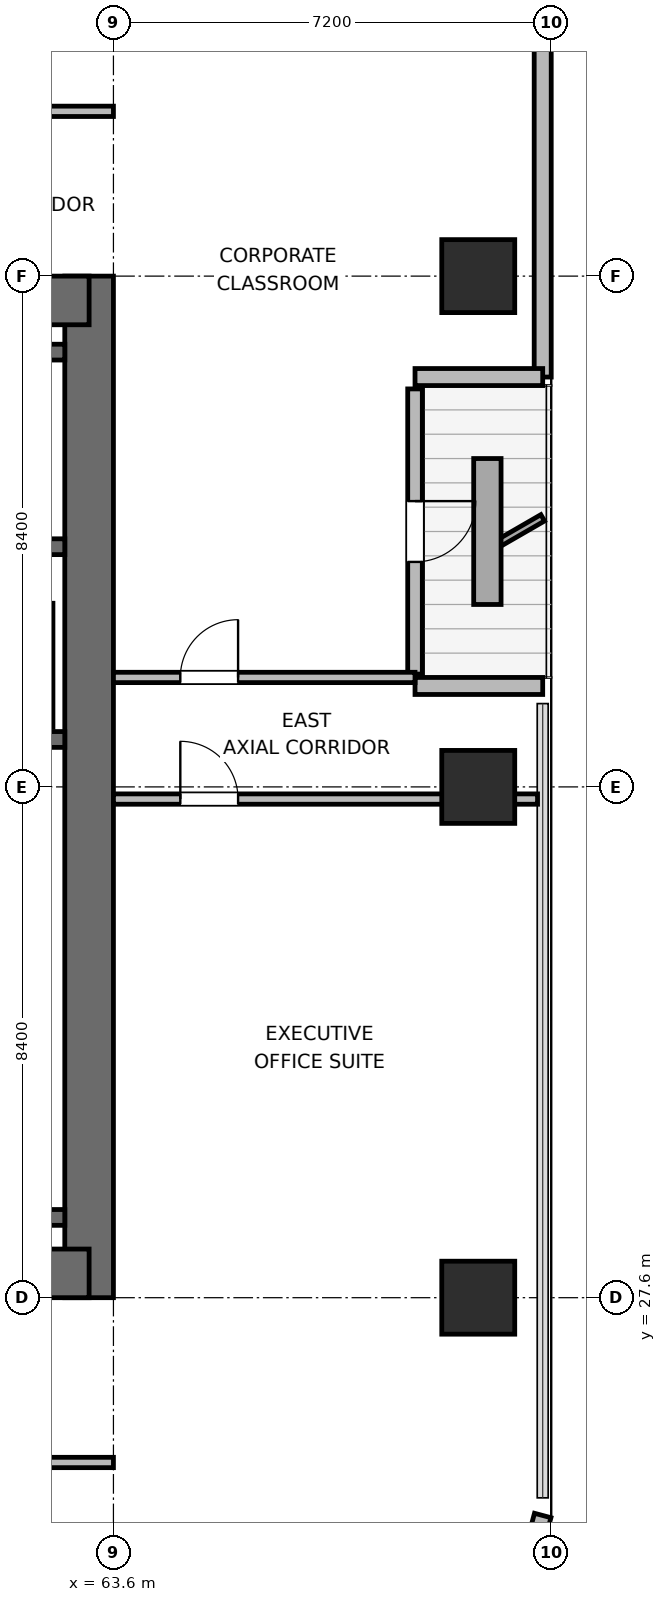
"""IFC4 building model, lengths in metres.
Left out: names, types, materials, properties, quantities, classifications, styles, units other than length and angle.
Written with IfcOpenShell. Run it as: python <this file> out.ifc"""

import sys

from ifc_helpers import new_model, si_unit, direction, frame, frame_2d, origin, origin_2d, place, context, subcontext, project, spatial, rectangle, extrude, element, fill, save


model = new_model("IFC4")
c1 = context("Model", 3, precision=1e-05, world=origin(), true_north=direction((0.0, 1.0)))
c2 = subcontext(c1, "Body", "Model", "MODEL_VIEW")
j1 = project(units=[si_unit("LENGTHUNIT", "METRE"), si_unit("PLANEANGLEUNIT", "RADIAN")], contexts=[c1])
p1 = place(None, origin())
s1 = spatial("IfcSite", under=j1, at=p1, CompositionType="ELEMENT")
p2 = place(p1, origin())
s2 = spatial("IfcBuilding", under=s1, at=p2, CompositionType="ELEMENT")
p3 = place(p2, frame((0.0, 0.0, 166.2)))
s3 = spatial("IfcBuildingStorey", under=s2, at=p3, CompositionType="ELEMENT", Elevation=166.2)
p4 = place(p3, frame((63.2, 27.6, 0.0), z_axis=(0.0, 0.0, 1.0), x_axis=(0.0, 1.0, 0.0)))
e1 = element("IfcWall", 1, at=p4, inside=s3, PredefinedType="SHEAR", context=c2, shape_type="SweptSolid", body=[
    extrude(rectangle(XDim=16.8, YDim=0.8, at=frame_2d((8.4, 0.0))), origin(), (0.0, 0.0, 1.0), 3.9),
])
p5 = place(p3, frame((54.0, 28.0, 0.0), z_axis=(0.0, 0.0, 1.0), x_axis=(1.0, 0.0, 0.0)))
e2 = element("IfcWall", 2, at=p5, inside=s3, PredefinedType="SHEAR", context=c2, shape_type="SweptSolid", body=[
    extrude(rectangle(XDim=9.2, YDim=0.8, at=frame_2d((4.6, 0.0))), origin(), (0.0, 0.0, 1.0), 3.9),
])
p6 = place(p5, frame((3.975, 0.0, 0.0)))
e3 = element("IfcOpeningElement", 3, at=p6, cuts=e2, PredefinedType="OPENING", context=c2, shape_type="SweptSolid", body=[
    extrude(rectangle(XDim=1.05, YDim=2.04, at=frame_2d((0.525, 1.02))), frame((0.0, 0.41, 0.0), z_axis=(0.0, -1.0, 0.0), x_axis=(1.0, 0.0, 0.0)), (0.0, 0.0, 1.0), 0.82),
])
p7 = place(p3, frame((54.0, 44.0, 0.0), z_axis=(0.0, 0.0, 1.0), x_axis=(1.0, 0.0, 0.0)))
e4 = element("IfcWall", 4, at=p7, inside=s3, PredefinedType="SHEAR", context=c2, shape_type="SweptSolid", body=[
    extrude(rectangle(XDim=9.2, YDim=0.8, at=frame_2d((4.6, 0.0))), origin(), (0.0, 0.0, 1.0), 3.9),
])
for number, where, z_axis, x_axis in (
    (5, (58.89, 28.92, 0.0), (0.0, 0.0, 1.0), (1.0, 0.0, 0.0)),
    (6, (58.89, 36.78, 0.0), (0.0, 0.0, 1.0), (1.0, 0.0, 0.0)),
):
    element("IfcWall", number, at=place(p3, frame(where, z_axis=z_axis, x_axis=x_axis)), inside=s3, PredefinedType="SHEAR", context=c2, shape_type="SweptSolid", body=[
        extrude(rectangle(XDim=3.91, YDim=0.26, at=frame_2d((1.955, 0.0))), origin(), (0.0, 0.0, 1.0), 3.9),
    ])
p8 = place(p3, frame((54.4, 39.95, 0.0), z_axis=(0.0, 0.0, 1.0), x_axis=(1.0, 0.0, 0.0)))
e7 = element("IfcWall", 7, at=p8, inside=s3, PredefinedType="SHEAR", context=c2, shape_type="SweptSolid", body=[
    extrude(rectangle(XDim=8.4, YDim=0.26, at=frame_2d((4.2, 0.0))), origin(), (0.0, 0.0, 1.0), 3.9),
])
p9 = place(p8, frame((0.8, 0.0, 0.0)))
e8 = element("IfcOpeningElement", 8, at=p9, cuts=e7, PredefinedType="OPENING", context=c2, shape_type="SweptSolid", body=[
    extrude(rectangle(XDim=1.0, YDim=2.04, at=frame_2d((0.5, 1.02))), frame((0.0, 0.14, 0.0), z_axis=(0.0, -1.0, 0.0), x_axis=(1.0, 0.0, 0.0)), (0.0, 0.0, 1.0), 0.28),
])
p10 = place(p3, frame((54.4, 43.15, 0.0), z_axis=(0.0, 0.0, 1.0), x_axis=(1.0, 0.0, 0.0)))
e9 = element("IfcWall", 9, at=p10, inside=s3, PredefinedType="SHEAR", context=c2, shape_type="SweptSolid", body=[
    extrude(rectangle(XDim=8.4, YDim=0.26, at=frame_2d((4.2, 0.0))), origin(), (0.0, 0.0, 1.0), 3.9),
])
for number, where, z_axis, x_axis in (
    (10, (69.6, 27.6, 0.0), (0.0, 0.0, 1.0), (1.0, 0.0, 0.0)),
    (11, (69.6, 36.0, 0.0), (0.0, 0.0, 1.0), (1.0, 0.0, 0.0)),
    (12, (69.6, 44.4, 0.0), (0.0, 0.0, 1.0), (1.0, 0.0, 0.0)),
):
    element("IfcColumn", number, at=place(p3, frame(where, z_axis=z_axis, x_axis=x_axis)), inside=s3, PredefinedType="COLUMN", context=c2, shape_type="SweptSolid", body=[
        extrude(rectangle(XDim=1.2, YDim=1.2, at=origin_2d()), origin(), (0.0, 0.0, 1.0), 3.9),
    ])
p11 = place(p3, frame((70.66, 56.982, 0.0), z_axis=(0.0, 0.0, 1.0), x_axis=(0.0, -1.0, 0.0)))
e13 = element("IfcWall", 13, at=p11, inside=s3, PredefinedType="SOLIDWALL", context=c2, shape_type="SweptSolid", body=[
    extrude(rectangle(XDim=14.242, YDim=0.28, at=frame_2d((7.121, 0.0))), origin(), (0.0, 0.0, 1.0), 3.68),
])
p12 = place(p3, frame((70.66, 42.74, 0.0), z_axis=(0.0, 0.0, 1.0), x_axis=(-1.0, 0.0, 0.0)))
e14 = element("IfcWall", 14, at=p12, inside=s3, PredefinedType="SOLIDWALL", context=c2, shape_type="SweptSolid", body=[
    extrude(rectangle(XDim=2.1, YDim=0.28, at=frame_2d((1.05, 0.0))), origin(), (0.0, 0.0, 1.0), 3.116),
])
p13 = place(p3, frame((68.56, 42.545, 0.0), z_axis=(0.0, 0.0, 1.0), x_axis=(0.0, -1.0, 0.0)))
e15 = element("IfcWall", 15, at=p13, inside=s3, PredefinedType="SOLIDWALL", context=c2, shape_type="SweptSolid", body=[
    extrude(rectangle(XDim=4.69, YDim=0.24, at=frame_2d((2.345, 0.0))), origin(), (0.0, 0.0, 1.0), 3.248),
])
p14 = place(p13, frame((1.845, 0.0, 0.0)))
e16 = element("IfcOpeningElement", 16, at=p14, cuts=e15, PredefinedType="OPENING", context=c2, shape_type="SweptSolid", body=[
    extrude(rectangle(XDim=1.0, YDim=2.02, at=frame_2d((0.5, 1.01))), frame((0.0, 0.13, 0.0), z_axis=(0.0, -1.0, 0.0), x_axis=(1.0, 0.0, 0.0)), (0.0, 0.0, 1.0), 0.26),
])
p15 = place(p3, frame((68.56, 37.66, 0.0), z_axis=(0.0, 0.0, 1.0), x_axis=(1.0, 0.0, 0.0)))
e17 = element("IfcWall", 17, at=p15, inside=s3, PredefinedType="SOLIDWALL", context=c2, shape_type="SweptSolid", body=[
    extrude(rectangle(XDim=2.1, YDim=0.28, at=frame_2d((1.05, 0.0))), origin(), (0.0, 0.0, 1.0), 3.116),
])
p16 = place(p3, frame((70.66, 24.018, 0.0), z_axis=(0.0, 0.0, 1.0), x_axis=(-0.258672222976, -0.9659651552, 0.0)))
e18 = element("IfcWall", 18, at=p16, inside=s3, PredefinedType="SOLIDWALL", context=c2, shape_type="SweptSolid", body=[
    extrude(rectangle(XDim=2.739, YDim=0.28, at=frame_2d((1.37, 0.0))), origin(), (0.0, 0.0, 1.0), 3.68),
])
p17 = place(p3, frame((62.5, 36.98, 0.0), z_axis=(0.0, 0.0, 1.0), x_axis=(0.0, 1.0, 0.0)))
e19 = element("IfcWall", 19, at=p17, inside=s3, PredefinedType="PARTITIONING", context=c2, shape_type="SweptSolid", body=[
    extrude(rectangle(XDim=2.04, YDim=0.21, at=frame_2d((1.02, 0.0))), origin(), (0.0, 0.0, 1.0), 3.68),
])
p18 = place(p3, frame((29.8, 24.89, 0.0), z_axis=(0.0, 0.0, 1.0), x_axis=(1.0, 0.0, 0.0)))
e20 = element("IfcWall", 20, at=p18, inside=s3, PredefinedType="PARTITIONING", context=c2, shape_type="SweptSolid", body=[
    extrude(rectangle(XDim=33.8, YDim=0.17, at=frame_2d((16.9, 0.0))), origin(), (0.0, 0.0, 1.0), 3.68),
])
p19 = place(p18, frame((2.37, 0.0, 0.0)))
e21 = element("IfcOpeningElement", 21, at=p19, cuts=e20, PredefinedType="OPENING", context=c2, shape_type="SweptSolid", body=[
    extrude(rectangle(XDim=0.95, YDim=2.04, at=frame_2d((0.475, 1.02))), frame((0.0, 0.095, 0.0), z_axis=(0.0, -1.0, 0.0), x_axis=(1.0, 0.0, 0.0)), (0.0, 0.0, 1.0), 0.19),
])
p20 = place(p18, frame((7.455, 0.0, 0.0)))
e22 = element("IfcOpeningElement", 22, at=p20, cuts=e20, PredefinedType="OPENING", context=c2, shape_type="SweptSolid", body=[
    extrude(rectangle(XDim=0.95, YDim=2.04, at=frame_2d((0.475, 1.02))), frame((0.0, 0.095, 0.0), z_axis=(0.0, -1.0, 0.0), x_axis=(1.0, 0.0, 0.0)), (0.0, 0.0, 1.0), 0.19),
])
p21 = place(p18, frame((11.51, 0.0, 0.0)))
e23 = element("IfcOpeningElement", 23, at=p21, cuts=e20, PredefinedType="OPENING", context=c2, shape_type="SweptSolid", body=[
    extrude(rectangle(XDim=0.95, YDim=2.04, at=frame_2d((0.475, 1.02))), frame((0.0, 0.095, 0.0), z_axis=(0.0, -1.0, 0.0), x_axis=(1.0, 0.0, 0.0)), (0.0, 0.0, 1.0), 0.19),
])
p22 = place(p18, frame((15.995, 0.0, 0.0)))
e24 = element("IfcOpeningElement", 24, at=p22, cuts=e20, PredefinedType="OPENING", context=c2, shape_type="SweptSolid", body=[
    extrude(rectangle(XDim=0.95, YDim=2.04, at=frame_2d((0.475, 1.02))), frame((0.0, 0.095, 0.0), z_axis=(0.0, -1.0, 0.0), x_axis=(1.0, 0.0, 0.0)), (0.0, 0.0, 1.0), 0.19),
])
p23 = place(p18, frame((20.91, 0.0, 0.0)))
e25 = element("IfcOpeningElement", 25, at=p23, cuts=e20, PredefinedType="OPENING", context=c2, shape_type="SweptSolid", body=[
    extrude(rectangle(XDim=0.95, YDim=2.04, at=frame_2d((0.475, 1.02))), frame((0.0, 0.095, 0.0), z_axis=(0.0, -1.0, 0.0), x_axis=(1.0, 0.0, 0.0)), (0.0, 0.0, 1.0), 0.19),
])
p24 = place(p18, frame((25.395, 0.0, 0.0)))
e26 = element("IfcOpeningElement", 26, at=p24, cuts=e20, PredefinedType="OPENING", context=c2, shape_type="SweptSolid", body=[
    extrude(rectangle(XDim=0.95, YDim=2.04, at=frame_2d((0.475, 1.02))), frame((0.0, 0.095, 0.0), z_axis=(0.0, -1.0, 0.0), x_axis=(1.0, 0.0, 0.0)), (0.0, 0.0, 1.0), 0.19),
])
p25 = place(p18, frame((30.48, 0.0, 0.0)))
e27 = element("IfcOpeningElement", 27, at=p25, cuts=e20, PredefinedType="OPENING", context=c2, shape_type="SweptSolid", body=[
    extrude(rectangle(XDim=0.95, YDim=2.04, at=frame_2d((0.475, 1.02))), frame((0.0, 0.095, 0.0), z_axis=(0.0, -1.0, 0.0), x_axis=(1.0, 0.0, 0.0)), (0.0, 0.0, 1.0), 0.19),
])
p26 = place(p3, frame((29.8, 47.11, 0.0), z_axis=(0.0, 0.0, 1.0), x_axis=(1.0, 0.0, 0.0)))
e28 = element("IfcWall", 28, at=p26, inside=s3, PredefinedType="PARTITIONING", context=c2, shape_type="SweptSolid", body=[
    extrude(rectangle(XDim=33.8, YDim=0.17, at=frame_2d((16.9, 0.0))), origin(), (0.0, 0.0, 1.0), 3.68),
])
p27 = place(p26, frame((0.625, 0.0, 0.0)))
e29 = element("IfcOpeningElement", 29, at=p27, cuts=e28, PredefinedType="OPENING", context=c2, shape_type="SweptSolid", body=[
    extrude(rectangle(XDim=0.95, YDim=2.04, at=frame_2d((0.475, 1.02))), frame((0.0, 0.095, 0.0), z_axis=(0.0, -1.0, 0.0), x_axis=(1.0, 0.0, 0.0)), (0.0, 0.0, 1.0), 0.19),
])
p28 = place(p26, frame((6.185, 0.0, 0.0)))
e30 = element("IfcOpeningElement", 30, at=p28, cuts=e28, PredefinedType="OPENING", context=c2, shape_type="SweptSolid", body=[
    extrude(rectangle(XDim=0.95, YDim=2.04, at=frame_2d((0.475, 1.02))), frame((0.0, 0.095, 0.0), z_axis=(0.0, -1.0, 0.0), x_axis=(1.0, 0.0, 0.0)), (0.0, 0.0, 1.0), 0.19),
])
p29 = place(p26, frame((12.465, 0.0, 0.0)))
e31 = element("IfcOpeningElement", 31, at=p29, cuts=e28, PredefinedType="OPENING", context=c2, shape_type="SweptSolid", body=[
    extrude(rectangle(XDim=0.95, YDim=2.04, at=frame_2d((0.475, 1.02))), frame((0.0, 0.095, 0.0), z_axis=(0.0, -1.0, 0.0), x_axis=(1.0, 0.0, 0.0)), (0.0, 0.0, 1.0), 0.19),
])
p30 = place(p26, frame((20.065, 0.0, 0.0)))
e32 = element("IfcOpeningElement", 32, at=p30, cuts=e28, PredefinedType="OPENING", context=c2, shape_type="SweptSolid", body=[
    extrude(rectangle(XDim=0.95, YDim=2.04, at=frame_2d((0.475, 1.02))), frame((0.0, 0.095, 0.0), z_axis=(0.0, -1.0, 0.0), x_axis=(1.0, 0.0, 0.0)), (0.0, 0.0, 1.0), 0.19),
])
p31 = place(p26, frame((29.585, 0.0, 0.0)))
e33 = element("IfcOpeningElement", 33, at=p31, cuts=e28, PredefinedType="OPENING", context=c2, shape_type="SweptSolid", body=[
    extrude(rectangle(XDim=0.95, YDim=2.04, at=frame_2d((0.475, 1.02))), frame((0.0, 0.095, 0.0), z_axis=(0.0, -1.0, 0.0), x_axis=(1.0, 0.0, 0.0)), (0.0, 0.0, 1.0), 0.19),
])
p32 = place(p3, frame((63.6, 35.8, 0.0), z_axis=(0.0, 0.0, 1.0), x_axis=(1.0, 0.0, 0.0)))
e34 = element("IfcWall", 34, at=p32, inside=s3, PredefinedType="PARTITIONING", context=c2, shape_type="SweptSolid", body=[
    extrude(rectangle(XDim=6.975, YDim=0.17, at=frame_2d((3.487, 0.0))), origin(), (0.0, 0.0, 1.0), 3.043),
])
p33 = place(p32, frame((1.1, 0.0, 0.0)))
e35 = element("IfcOpeningElement", 35, at=p33, cuts=e34, PredefinedType="OPENING", context=c2, shape_type="SweptSolid", body=[
    extrude(rectangle(XDim=0.95, YDim=2.04, at=frame_2d((0.475, 1.02))), frame((0.0, 0.095, 0.0), z_axis=(0.0, -1.0, 0.0), x_axis=(1.0, 0.0, 0.0)), (0.0, 0.0, 1.0), 0.19),
])
p34 = place(p3, frame((63.6, 37.8, 0.0), z_axis=(0.0, 0.0, 1.0), x_axis=(1.0, 0.0, 0.0)))
e36 = element("IfcWall", 36, at=p34, inside=s3, PredefinedType="PARTITIONING", context=c2, shape_type="SweptSolid", body=[
    extrude(rectangle(XDim=4.96, YDim=0.17, at=frame_2d((2.48, 0.0))), origin(), (0.0, 0.0, 1.0), 3.68),
])
p35 = place(p34, frame((1.1, 0.0, 0.0)))
e37 = element("IfcOpeningElement", 37, at=p35, cuts=e36, PredefinedType="OPENING", context=c2, shape_type="SweptSolid", body=[
    extrude(rectangle(XDim=0.95, YDim=2.04, at=frame_2d((0.475, 1.02))), frame((0.0, 0.095, 0.0), z_axis=(0.0, -1.0, 0.0), x_axis=(1.0, 0.0, 0.0)), (0.0, 0.0, 1.0), 0.19),
])
p36 = place(p14, origin())
e38 = element("IfcDoor", 38, at=p36, inside=s3, OperationType="SINGLE_SWING_LEFT", PredefinedType="DOOR", context=c2, shape_type="SweptSolid", body=[
    extrude(rectangle(XDim=1.0, YDim=2.02, at=frame_2d((0.5, 1.01))), frame((0.0, 0.025, 0.0), z_axis=(0.0, -1.0, 0.0), x_axis=(1.0, 0.0, 0.0)), (0.0, 0.0, 1.0), 0.05),
])
fill(e16, e38)
p37 = place(p33, origin())
e39 = element("IfcDoor", 39, at=p37, inside=s3, OperationType="SINGLE_SWING_LEFT", PredefinedType="DOOR", context=c2, shape_type="SweptSolid", body=[
    extrude(rectangle(XDim=0.95, YDim=2.04, at=frame_2d((0.475, 1.02))), frame((0.0, 0.025, 0.0), z_axis=(0.0, -1.0, 0.0), x_axis=(1.0, 0.0, 0.0)), (0.0, 0.0, 1.0), 0.05),
])
fill(e35, e39)
p38 = place(p35, origin())
e40 = element("IfcDoor", 40, at=p38, inside=s3, OperationType="SINGLE_SWING_RIGHT", PredefinedType="DOOR", context=c2, shape_type="SweptSolid", body=[
    extrude(rectangle(XDim=0.95, YDim=2.04, at=frame_2d((0.475, 1.02))), frame((0.0, 0.025, 0.0), z_axis=(0.0, -1.0, 0.0), x_axis=(1.0, 0.0, 0.0)), (0.0, 0.0, 1.0), 0.05),
])
fill(e37, e40)
save(model, sys.argv[1])
